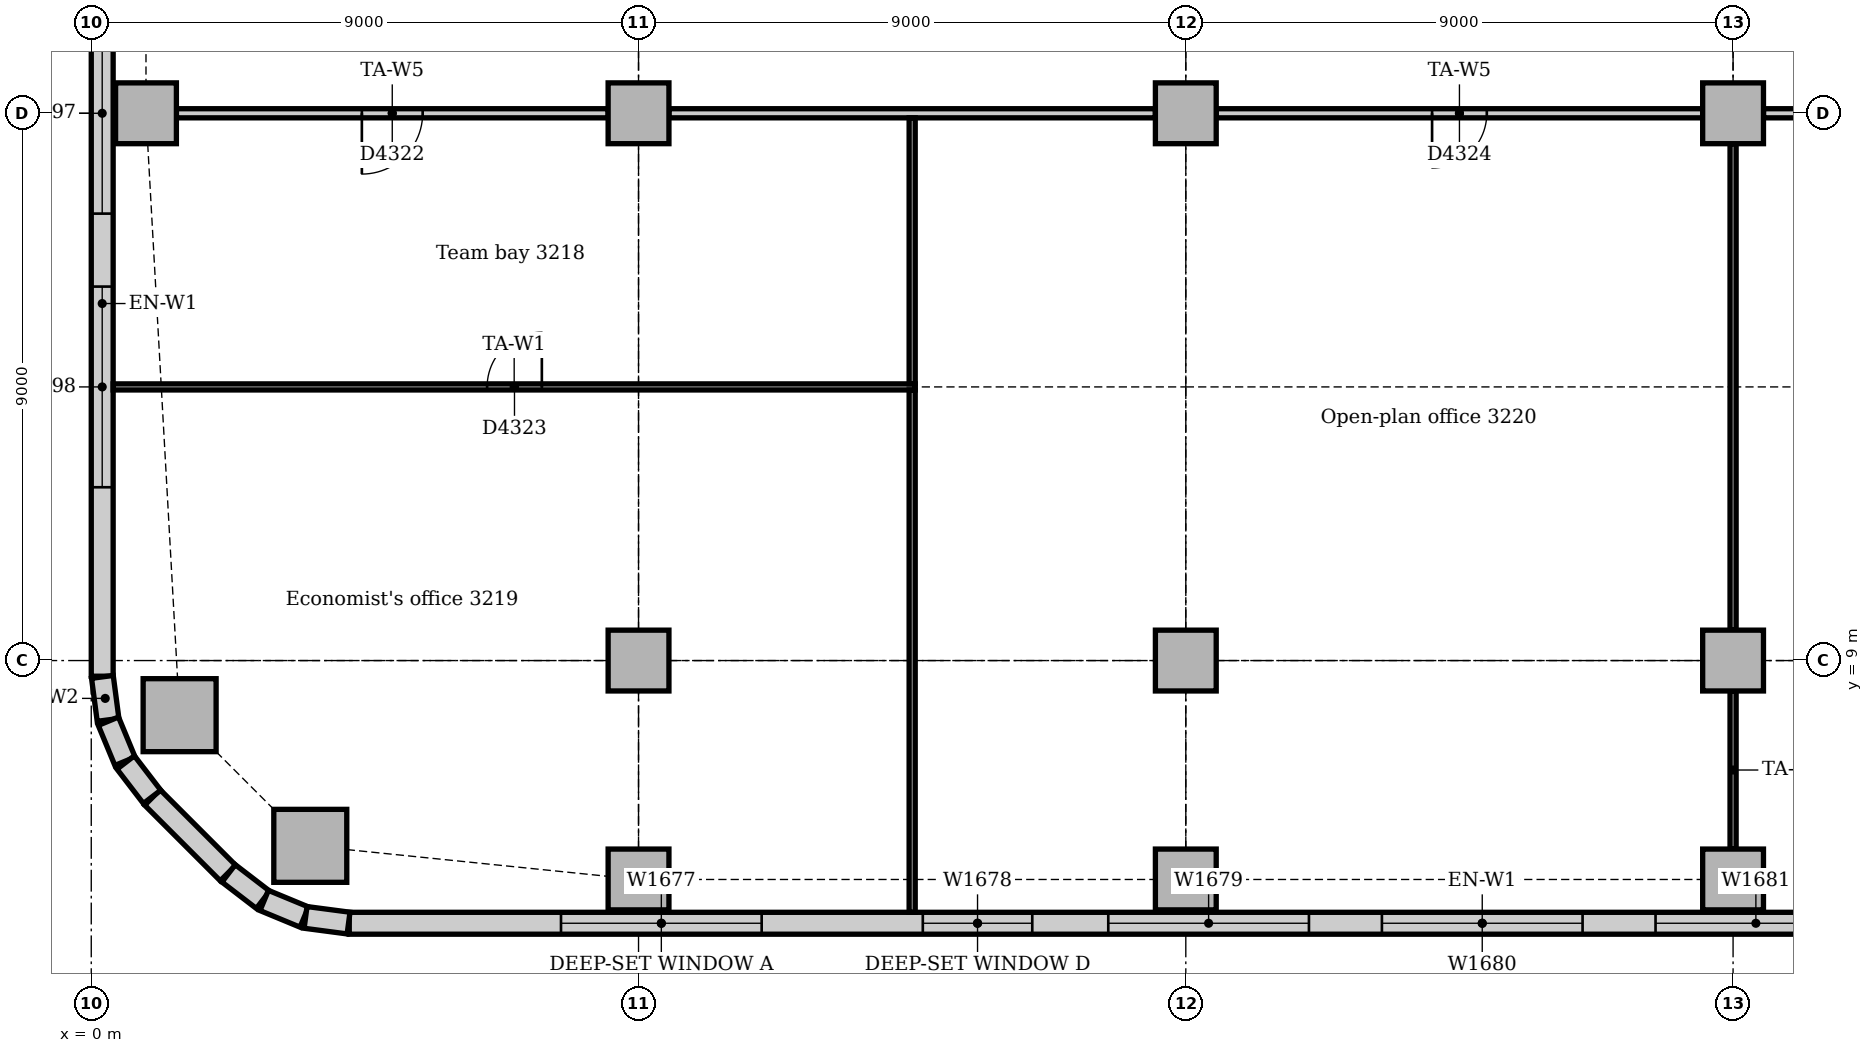
"""IFC4 building model, lengths in metres.
Left out: names, types, materials, properties, quantities, classifications, styles, units other than length and angle.
Written with IfcOpenShell. Run it as: python <this file> out.ifc"""

import sys

from ifc_helpers import new_model, si_unit, direction, frame, frame_2d, origin, origin_2d, place, context, subcontext, project, spatial, rectangle, extrude, element, fill, save


model = new_model("IFC4")
c1 = context("Model", 3, precision=1e-05, world=origin(), true_north=direction((0.0, 1.0)))
c2 = subcontext(c1, "Body", "Model", "MODEL_VIEW")
j1 = project(units=[si_unit("LENGTHUNIT", "METRE"), si_unit("PLANEANGLEUNIT", "RADIAN")], contexts=[c1])
p1 = place(None, origin())
s1 = spatial("IfcSite", under=j1, at=p1, CompositionType="ELEMENT")
p2 = place(p1, origin())
s2 = spatial("IfcBuilding", under=s1, at=p2, CompositionType="ELEMENT")
p3 = place(p2, frame((0.0, 0.0, 136.0)))
s3 = spatial("IfcBuildingStorey", under=s2, at=p3, CompositionType="ELEMENT", Elevation=136.0)
for number, where, z_axis, x_axis in (
    (1, (3.602, 5.953, 0.0), (0.0, 0.0, 1.0), (1.0, 0.0, 0.0)),
    (2, (1.453, 8.102, 0.0), (0.0, 0.0, 1.0), (1.0, 0.0, 0.0)),
):
    element("IfcColumn", number, at=place(p3, frame(where, z_axis=z_axis, x_axis=x_axis)), inside=s3, PredefinedType="COLUMN", context=c2, shape_type="SweptSolid", body=[
        extrude(rectangle(XDim=1.2, YDim=1.2, at=origin_2d()), origin(), (0.0, 0.0, 1.0), 3.85),
    ])
for number, where, z_axis, x_axis in (
    (3, (9.0, 5.4, 0.0), (0.0, 0.0, 1.0), (1.0, 0.0, 0.0)),
    (4, (18.0, 5.4, 0.0), (0.0, 0.0, 1.0), (1.0, 0.0, 0.0)),
    (5, (27.0, 5.4, 0.0), (0.0, 0.0, 1.0), (1.0, 0.0, 0.0)),
    (6, (0.9, 18.0, 0.0), (0.0, 0.0, 1.0), (1.0, 0.0, 0.0)),
    (7, (9.0, 9.0, 0.0), (0.0, 0.0, 1.0), (1.0, 0.0, 0.0)),
    (8, (9.0, 18.0, 0.0), (0.0, 0.0, 1.0), (1.0, 0.0, 0.0)),
    (9, (18.0, 9.0, 0.0), (0.0, 0.0, 1.0), (1.0, 0.0, 0.0)),
    (10, (18.0, 18.0, 0.0), (0.0, 0.0, 1.0), (1.0, 0.0, 0.0)),
    (11, (27.0, 9.0, 0.0), (0.0, 0.0, 1.0), (1.0, 0.0, 0.0)),
    (12, (27.0, 18.0, 0.0), (0.0, 0.0, 1.0), (1.0, 0.0, 0.0)),
):
    element("IfcColumn", number, at=place(p3, frame(where, z_axis=z_axis, x_axis=x_axis)), inside=s3, PredefinedType="COLUMN", context=c2, shape_type="SweptSolid", body=[
        extrude(rectangle(XDim=1.0, YDim=1.0, at=origin_2d()), origin(), (0.0, 0.0, 1.0), 3.85),
    ])
p4 = place(p3, frame((4.243, 4.68, 0.0), z_axis=(0.0, 0.0, 1.0), x_axis=(1.0, 0.0, 0.0)))
e13 = element("IfcWall", 13, at=p4, inside=s3, PredefinedType="STANDARD", context=c2, shape_type="SweptSolid", body=[
    extrude(rectangle(XDim=37.265, YDim=0.36, at=frame_2d((18.632, 0.0))), origin(), (0.0, 0.0, 1.0), 3.85),
])
p5 = place(p4, frame((3.482, 0.0, 0.9)))
e14 = element("IfcOpeningElement", 14, at=p5, cuts=e13, PredefinedType="OPENING", context=c2, shape_type="SweptSolid", body=[
    extrude(rectangle(XDim=3.3, YDim=1.6, at=frame_2d((1.65, 0.8))), frame((0.0, 0.19, 0.0), z_axis=(0.0, -1.0, 0.0), x_axis=(1.0, 0.0, 0.0)), (0.0, 0.0, 1.0), 0.38),
])
p6 = place(p4, frame((9.432, 0.0, 0.9)))
e15 = element("IfcOpeningElement", 15, at=p6, cuts=e13, PredefinedType="OPENING", context=c2, shape_type="SweptSolid", body=[
    extrude(rectangle(XDim=1.8, YDim=1.6, at=frame_2d((0.9, 0.8))), frame((0.0, 0.19, 0.0), z_axis=(0.0, -1.0, 0.0), x_axis=(1.0, 0.0, 0.0)), (0.0, 0.0, 1.0), 0.38),
])
p7 = place(p4, frame((12.482, 0.0, 0.9)))
e16 = element("IfcOpeningElement", 16, at=p7, cuts=e13, PredefinedType="OPENING", context=c2, shape_type="SweptSolid", body=[
    extrude(rectangle(XDim=3.3, YDim=1.6, at=frame_2d((1.65, 0.8))), frame((0.0, 0.19, 0.0), z_axis=(0.0, -1.0, 0.0), x_axis=(1.0, 0.0, 0.0)), (0.0, 0.0, 1.0), 0.38),
])
p8 = place(p4, frame((16.982, 0.0, 0.9)))
e17 = element("IfcOpeningElement", 17, at=p8, cuts=e13, PredefinedType="OPENING", context=c2, shape_type="SweptSolid", body=[
    extrude(rectangle(XDim=3.3, YDim=1.6, at=frame_2d((1.65, 0.8))), frame((0.0, 0.19, 0.0), z_axis=(0.0, -1.0, 0.0), x_axis=(1.0, 0.0, 0.0)), (0.0, 0.0, 1.0), 0.38),
])
p9 = place(p4, frame((21.482, 0.0, 0.9)))
e18 = element("IfcOpeningElement", 18, at=p9, cuts=e13, PredefinedType="OPENING", context=c2, shape_type="SweptSolid", body=[
    extrude(rectangle(XDim=3.3, YDim=1.6, at=frame_2d((1.65, 0.8))), frame((0.0, 0.19, 0.0), z_axis=(0.0, -1.0, 0.0), x_axis=(1.0, 0.0, 0.0)), (0.0, 0.0, 1.0), 0.38),
])
p10 = place(p4, frame((25.982, 0.0, 0.9)))
e19 = element("IfcOpeningElement", 19, at=p10, cuts=e13, PredefinedType="OPENING", context=c2, shape_type="SweptSolid", body=[
    extrude(rectangle(XDim=3.3, YDim=1.6, at=frame_2d((1.65, 0.8))), frame((0.0, 0.19, 0.0), z_axis=(0.0, -1.0, 0.0), x_axis=(1.0, 0.0, 0.0)), (0.0, 0.0, 1.0), 0.38),
])
p11 = place(p4, frame((30.482, 0.0, 0.9)))
e20 = element("IfcOpeningElement", 20, at=p11, cuts=e13, PredefinedType="OPENING", context=c2, shape_type="SweptSolid", body=[
    extrude(rectangle(XDim=3.3, YDim=1.6, at=frame_2d((1.65, 0.8))), frame((0.0, 0.19, 0.0), z_axis=(0.0, -1.0, 0.0), x_axis=(1.0, 0.0, 0.0)), (0.0, 0.0, 1.0), 0.38),
])
p12 = place(p3, frame((0.18, 21.0, 0.0), z_axis=(0.0, 0.0, 1.0), x_axis=(0.0, -1.0, 0.0)))
e21 = element("IfcWall", 21, at=p12, inside=s3, PredefinedType="STANDARD", context=c2, shape_type="SweptSolid", body=[
    extrude(rectangle(XDim=12.257, YDim=0.36, at=frame_2d((6.129, 0.0))), origin(), (0.0, 0.0, 1.0), 3.85),
])
p13 = place(p12, frame((1.35, 0.0, 0.9)))
e22 = element("IfcOpeningElement", 22, at=p13, cuts=e21, PredefinedType="OPENING", context=c2, shape_type="SweptSolid", body=[
    extrude(rectangle(XDim=3.3, YDim=1.6, at=frame_2d((1.65, 0.8))), frame((0.0, 0.19, 0.0), z_axis=(0.0, -1.0, 0.0), x_axis=(1.0, 0.0, 0.0)), (0.0, 0.0, 1.0), 0.38),
])
p14 = place(p12, frame((5.85, 0.0, 0.9)))
e23 = element("IfcOpeningElement", 23, at=p14, cuts=e21, PredefinedType="OPENING", context=c2, shape_type="SweptSolid", body=[
    extrude(rectangle(XDim=3.3, YDim=1.6, at=frame_2d((1.65, 0.8))), frame((0.0, 0.19, 0.0), z_axis=(0.0, -1.0, 0.0), x_axis=(1.0, 0.0, 0.0)), (0.0, 0.0, 1.0), 0.38),
])
p15 = place(p3, frame((1.006, 6.749, 0.0), z_axis=(0.0, 0.0, 1.0), x_axis=(0.707106781187, -0.707106781187, 0.0)))
e24 = element("IfcWall", 24, at=p15, inside=s3, PredefinedType="STANDARD", context=c2, shape_type="SweptSolid", body=[
    extrude(rectangle(XDim=1.757, YDim=0.36, at=frame_2d((0.879, 0.0))), origin(), (0.0, 0.0, 1.0), 3.85),
])
for number, where, z_axis, x_axis in (
    (25, (0.183, 8.731, 0.0), (0.0, 0.0, 1.0), (0.131, -0.991, 0.0)),
    (26, (0.282, 8.003, 0.0), (0.0, 0.0, 1.0), (0.383, -0.924, 0.0)),
):
    element("IfcWall", number, at=place(p3, frame(where, z_axis=z_axis, x_axis=x_axis)), inside=s3, PredefinedType="STANDARD", context=c2, shape_type="SweptSolid", body=[
        extrude(rectangle(XDim=0.713, YDim=0.36, at=frame_2d((0.356, 0.0))), origin(), (0.0, 0.0, 1.0), 3.85),
    ])
for number, where, z_axis, x_axis in (
    (27, (0.566, 7.324, 0.0), (0.0, 0.0, 1.0), (0.609, -0.793, 0.0)),
    (28, (2.259, 5.5, 0.0), (0.0, 0.0, 1.0), (0.793, -0.609, 0.0)),
):
    element("IfcWall", number, at=place(p3, frame(where, z_axis=z_axis, x_axis=x_axis)), inside=s3, PredefinedType="STANDARD", context=c2, shape_type="SweptSolid", body=[
        extrude(rectangle(XDim=0.713, YDim=0.36, at=frame_2d((0.357, 0.0))), origin(), (0.0, 0.0, 1.0), 3.85),
    ])
for number, where, z_axis, x_axis in (
    (29, (2.844, 5.055, 0.0), (0.0, 0.0, 1.0), (0.924, -0.383, 0.0)),
    (30, (3.524, 4.776, 0.0), (0.0, 0.0, 1.0), (0.991, -0.131, 0.0)),
):
    element("IfcWall", number, at=place(p3, frame(where, z_axis=z_axis, x_axis=x_axis)), inside=s3, PredefinedType="STANDARD", context=c2, shape_type="SweptSolid", body=[
        extrude(rectangle(XDim=0.713, YDim=0.36, at=frame_2d((0.356, 0.0))), origin(), (0.0, 0.0, 1.0), 3.85),
    ])
p16 = place(p3, frame((27.5, 18.0, 0.0), z_axis=(0.0, 0.0, 1.0), x_axis=(1.0, 0.0, 0.0)))
e31 = element("IfcWall", 31, at=p16, inside=s3, PredefinedType="PARTITIONING", context=c2, shape_type="SweptSolid", body=[
    extrude(rectangle(XDim=8.0, YDim=0.15, at=frame_2d((4.0, 0.0))), origin(), (0.0, 0.0, 1.0), 3.158),
])
p17 = place(p16, frame((3.55, 0.0, 0.0)))
e32 = element("IfcOpeningElement", 32, at=p17, cuts=e31, PredefinedType="OPENING", context=c2, shape_type="SweptSolid", body=[
    extrude(rectangle(XDim=0.9, YDim=2.1, at=frame_2d((0.45, 1.05))), frame((0.0, 0.085, 0.0), z_axis=(0.0, -1.0, 0.0), x_axis=(1.0, 0.0, 0.0)), (0.0, 0.0, 1.0), 0.17),
])
p18 = place(p3, frame((18.5, 18.0, 0.0), z_axis=(0.0, 0.0, 1.0), x_axis=(1.0, 0.0, 0.0)))
e33 = element("IfcWall", 33, at=p18, inside=s3, PredefinedType="PARTITIONING", context=c2, shape_type="SweptSolid", body=[
    extrude(rectangle(XDim=8.0, YDim=0.15, at=frame_2d((4.0, 0.0))), origin(), (0.0, 0.0, 1.0), 3.158),
])
p19 = place(p18, frame((3.55, 0.0, 0.0)))
e34 = element("IfcOpeningElement", 34, at=p19, cuts=e33, PredefinedType="OPENING", context=c2, shape_type="SweptSolid", body=[
    extrude(rectangle(XDim=0.9, YDim=2.1, at=frame_2d((0.45, 1.05))), frame((0.0, 0.085, 0.0), z_axis=(0.0, -1.0, 0.0), x_axis=(1.0, 0.0, 0.0)), (0.0, 0.0, 1.0), 0.17),
])
p20 = place(p3, frame((9.5, 18.0, 0.0), z_axis=(0.0, 0.0, 1.0), x_axis=(1.0, 0.0, 0.0)))
e35 = element("IfcWall", 35, at=p20, inside=s3, PredefinedType="PARTITIONING", context=c2, shape_type="SweptSolid", body=[
    extrude(rectangle(XDim=8.0, YDim=0.15, at=frame_2d((4.0, 0.0))), origin(), (0.0, 0.0, 1.0), 3.158),
])
p21 = place(p3, frame((1.4, 18.0, 0.0), z_axis=(0.0, 0.0, 1.0), x_axis=(1.0, 0.0, 0.0)))
e36 = element("IfcWall", 36, at=p21, inside=s3, PredefinedType="PARTITIONING", context=c2, shape_type="SweptSolid", body=[
    extrude(rectangle(XDim=7.1, YDim=0.15, at=frame_2d((3.55, 0.0))), origin(), (0.0, 0.0, 1.0), 3.158),
])
p22 = place(p21, frame((3.05, 0.0, 0.0)))
e37 = element("IfcOpeningElement", 37, at=p22, cuts=e36, PredefinedType="OPENING", context=c2, shape_type="SweptSolid", body=[
    extrude(rectangle(XDim=1.0, YDim=2.1, at=frame_2d((0.5, 1.05))), frame((0.0, 0.085, 0.0), z_axis=(0.0, -1.0, 0.0), x_axis=(1.0, 0.0, 0.0)), (0.0, 0.0, 1.0), 0.17),
])
p23 = place(p3, frame((0.36, 13.5, 0.0), z_axis=(0.0, 0.0, 1.0), x_axis=(1.0, 0.0, 0.0)))
e38 = element("IfcWall", 38, at=p23, inside=s3, PredefinedType="PARTITIONING", context=c2, shape_type="SweptSolid", body=[
    extrude(rectangle(XDim=13.19, YDim=0.1, at=frame_2d((6.595, 0.0))), origin(), (0.0, 0.0, 1.0), 3.354),
])
p24 = place(p23, frame((6.15, 0.0, 0.0)))
e39 = element("IfcOpeningElement", 39, at=p24, cuts=e38, PredefinedType="OPENING", context=c2, shape_type="SweptSolid", body=[
    extrude(rectangle(XDim=0.9, YDim=2.1, at=frame_2d((0.45, 1.05))), frame((0.0, 0.06, 0.0), z_axis=(0.0, -1.0, 0.0), x_axis=(1.0, 0.0, 0.0)), (0.0, 0.0, 1.0), 0.12),
])
p25 = place(p3, frame((13.5, 13.55, 0.0), z_axis=(0.0, 0.0, 1.0), x_axis=(0.0, 1.0, 0.0)))
e40 = element("IfcWall", 40, at=p25, inside=s3, PredefinedType="PARTITIONING", context=c2, shape_type="SweptSolid", body=[
    extrude(rectangle(XDim=4.375, YDim=0.1, at=frame_2d((2.188, 0.0))), origin(), (0.0, 0.0, 1.0), 3.85),
])
p26 = place(p3, frame((13.5, 4.86, 0.0), z_axis=(0.0, 0.0, 1.0), x_axis=(0.0, 1.0, 0.0)))
e41 = element("IfcWall", 41, at=p26, inside=s3, PredefinedType="PARTITIONING", context=c2, shape_type="SweptSolid", body=[
    extrude(rectangle(XDim=8.59, YDim=0.1, at=frame_2d((4.295, 0.0))), origin(), (0.0, 0.0, 1.0), 3.85),
])
p27 = place(p3, frame((27.0, 5.9, 0.0), z_axis=(0.0, 0.0, 1.0), x_axis=(0.0, 1.0, 0.0)))
e42 = element("IfcWall", 42, at=p27, inside=s3, PredefinedType="PARTITIONING", context=c2, shape_type="SweptSolid", body=[
    extrude(rectangle(XDim=2.6, YDim=0.1, at=frame_2d((1.3, 0.0))), origin(), (0.0, 0.0, 1.0), 3.652),
])
p28 = place(p3, frame((27.0, 9.5, 0.0), z_axis=(0.0, 0.0, 1.0), x_axis=(0.0, 1.0, 0.0)))
e43 = element("IfcWall", 43, at=p28, inside=s3, PredefinedType="PARTITIONING", context=c2, shape_type="SweptSolid", body=[
    extrude(rectangle(XDim=8.0, YDim=0.1, at=frame_2d((4.0, 0.0))), origin(), (0.0, 0.0, 1.0), 3.256),
])
p29 = place(p5, origin())
e44 = element("IfcWindow", 44, at=p29, inside=s3, PartitioningType="SINGLE_PANEL", PredefinedType="WINDOW", context=c2, shape_type="SweptSolid", body=[
    extrude(rectangle(XDim=3.3, YDim=1.6, at=frame_2d((1.65, 0.8))), frame((0.0, 0.13, 0.0), z_axis=(0.0, -1.0, 0.0), x_axis=(1.0, 0.0, 0.0)), (0.0, 0.0, 1.0), 0.06),
])
fill(e14, e44)
p30 = place(p6, origin())
e45 = element("IfcWindow", 45, at=p30, inside=s3, PartitioningType="SINGLE_PANEL", PredefinedType="WINDOW", context=c2, shape_type="SweptSolid", body=[
    extrude(rectangle(XDim=1.8, YDim=1.6, at=frame_2d((0.9, 0.8))), frame((0.0, 0.13, 0.0), z_axis=(0.0, -1.0, 0.0), x_axis=(1.0, 0.0, 0.0)), (0.0, 0.0, 1.0), 0.06),
])
fill(e15, e45)
p31 = place(p7, origin())
e46 = element("IfcWindow", 46, at=p31, inside=s3, PartitioningType="SINGLE_PANEL", PredefinedType="WINDOW", context=c2, shape_type="SweptSolid", body=[
    extrude(rectangle(XDim=3.3, YDim=1.6, at=frame_2d((1.65, 0.8))), frame((0.0, 0.13, 0.0), z_axis=(0.0, -1.0, 0.0), x_axis=(1.0, 0.0, 0.0)), (0.0, 0.0, 1.0), 0.06),
])
fill(e16, e46)
p32 = place(p8, origin())
e47 = element("IfcWindow", 47, at=p32, inside=s3, PartitioningType="SINGLE_PANEL", PredefinedType="WINDOW", context=c2, shape_type="SweptSolid", body=[
    extrude(rectangle(XDim=3.3, YDim=1.6, at=frame_2d((1.65, 0.8))), frame((0.0, 0.13, 0.0), z_axis=(0.0, -1.0, 0.0), x_axis=(1.0, 0.0, 0.0)), (0.0, 0.0, 1.0), 0.06),
])
fill(e17, e47)
p33 = place(p9, origin())
e48 = element("IfcWindow", 48, at=p33, inside=s3, PartitioningType="SINGLE_PANEL", PredefinedType="WINDOW", context=c2, shape_type="SweptSolid", body=[
    extrude(rectangle(XDim=3.3, YDim=1.6, at=frame_2d((1.65, 0.8))), frame((0.0, 0.13, 0.0), z_axis=(0.0, -1.0, 0.0), x_axis=(1.0, 0.0, 0.0)), (0.0, 0.0, 1.0), 0.06),
])
fill(e18, e48)
p34 = place(p13, origin())
e49 = element("IfcWindow", 49, at=p34, inside=s3, PartitioningType="SINGLE_PANEL", PredefinedType="WINDOW", context=c2, shape_type="SweptSolid", body=[
    extrude(rectangle(XDim=3.3, YDim=1.6, at=frame_2d((1.65, 0.8))), frame((0.0, 0.13, 0.0), z_axis=(0.0, -1.0, 0.0), x_axis=(1.0, 0.0, 0.0)), (0.0, 0.0, 1.0), 0.06),
])
fill(e22, e49)
p35 = place(p14, origin())
e50 = element("IfcWindow", 50, at=p35, inside=s3, PartitioningType="SINGLE_PANEL", PredefinedType="WINDOW", context=c2, shape_type="SweptSolid", body=[
    extrude(rectangle(XDim=3.3, YDim=1.6, at=frame_2d((1.65, 0.8))), frame((0.0, 0.13, 0.0), z_axis=(0.0, -1.0, 0.0), x_axis=(1.0, 0.0, 0.0)), (0.0, 0.0, 1.0), 0.06),
])
fill(e23, e50)
p36 = place(p22, frame((1.0, 0.0, 0.0), z_axis=(0.0, 0.0, 1.0), x_axis=(-1.0, 0.0, 0.0)))
e51 = element("IfcDoor", 51, at=p36, inside=s3, OperationType="SINGLE_SWING_RIGHT", PredefinedType="DOOR", context=c2, shape_type="SweptSolid", body=[
    extrude(rectangle(XDim=1.0, YDim=2.1, at=frame_2d((0.5, 1.05))), frame((0.0, 0.025, 0.0), z_axis=(0.0, -1.0, 0.0), x_axis=(1.0, 0.0, 0.0)), (0.0, 0.0, 1.0), 0.05),
])
fill(e37, e51)
p37 = place(p24, origin())
e52 = element("IfcDoor", 52, at=p37, inside=s3, OperationType="SINGLE_SWING_RIGHT", PredefinedType="DOOR", context=c2, shape_type="SweptSolid", body=[
    extrude(rectangle(XDim=0.9, YDim=2.1, at=frame_2d((0.45, 1.05))), frame((0.0, 0.025, 0.0), z_axis=(0.0, -1.0, 0.0), x_axis=(1.0, 0.0, 0.0)), (0.0, 0.0, 1.0), 0.05),
])
fill(e39, e52)
p38 = place(p19, frame((0.9, 0.0, 0.0), z_axis=(0.0, 0.0, 1.0), x_axis=(-1.0, 0.0, 0.0)))
e53 = element("IfcDoor", 53, at=p38, inside=s3, OperationType="SINGLE_SWING_RIGHT", PredefinedType="DOOR", context=c2, shape_type="SweptSolid", body=[
    extrude(rectangle(XDim=0.9, YDim=2.1, at=frame_2d((0.45, 1.05))), frame((0.0, 0.025, 0.0), z_axis=(0.0, -1.0, 0.0), x_axis=(1.0, 0.0, 0.0)), (0.0, 0.0, 1.0), 0.05),
])
fill(e34, e53)
save(model, sys.argv[1])
